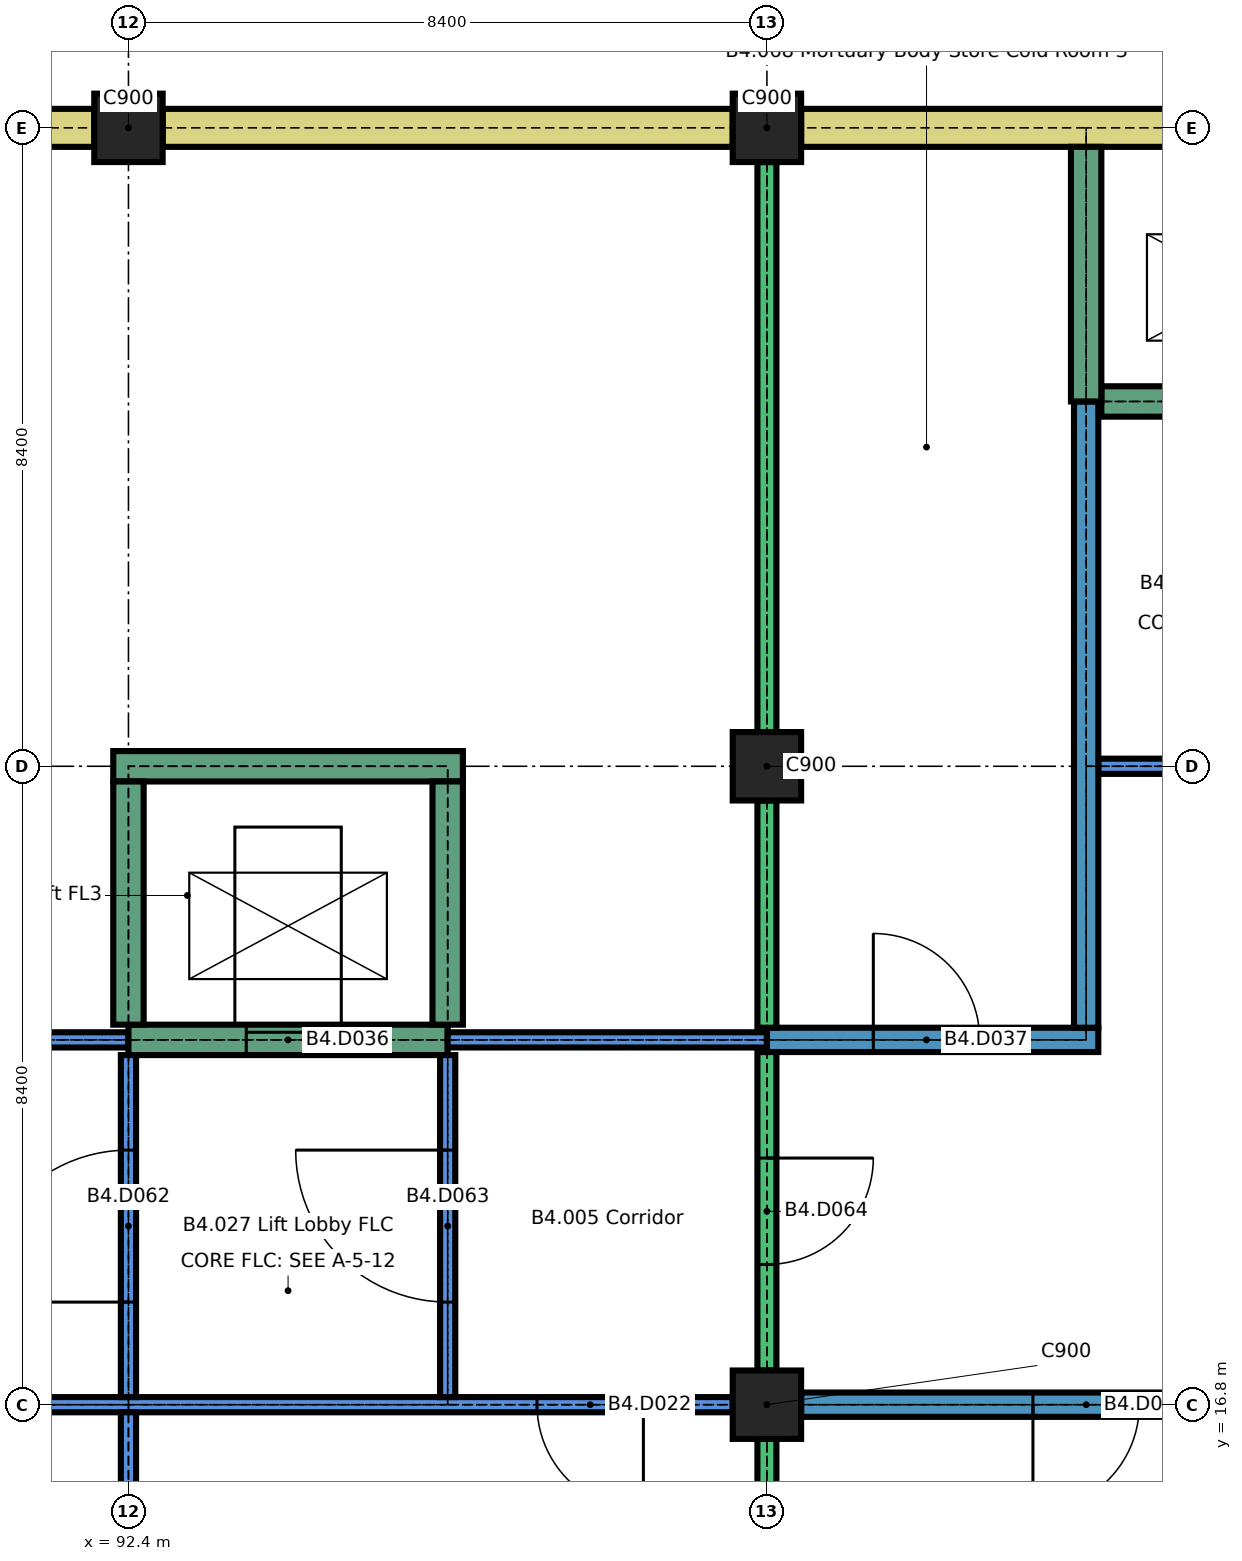
"""IFC4 building model, lengths in metres.
Left out: names, types, materials, properties, quantities, classifications, styles, units other than length and angle.
Written with IfcOpenShell. Run it as: python <this file> out.ifc"""

import sys

from ifc_helpers import new_model, si_unit, direction, frame, frame_2d, origin, origin_2d, place, context, subcontext, project, spatial, rectangle, extrude, element, fill, save


model = new_model("IFC4")
c1 = context("Model", 3, precision=1e-05, world=origin(), true_north=direction((0.0, 1.0)))
c2 = subcontext(c1, "Body", "Model", "MODEL_VIEW")
j1 = project(units=[si_unit("LENGTHUNIT", "METRE"), si_unit("PLANEANGLEUNIT", "RADIAN")], contexts=[c1])
p1 = place(None, origin())
s1 = spatial("IfcSite", under=j1, at=p1, CompositionType="ELEMENT")
p2 = place(p1, origin())
s2 = spatial("IfcBuilding", under=s1, at=p2, CompositionType="ELEMENT")
p3 = place(p2, frame((0.0, 0.0, -15.0)))
s3 = spatial("IfcBuildingStorey", under=s2, at=p3, CompositionType="ELEMENT", Elevation=-15.0)
for number, where, z_axis, x_axis in (
    (1, (100.8, 16.8, 0.0), (0.0, 0.0, 1.0), (1.0, 0.0, 0.0)),
    (2, (100.8, 25.2, 0.0), (0.0, 0.0, 1.0), (1.0, 0.0, 0.0)),
    (3, (92.4, 33.6, 0.0), (0.0, 0.0, 1.0), (1.0, 0.0, 0.0)),
    (4, (100.8, 33.6, 0.0), (0.0, 0.0, 1.0), (1.0, 0.0, 0.0)),
):
    element("IfcColumn", number, at=place(p3, frame(where, z_axis=z_axis, x_axis=x_axis)), inside=s3, PredefinedType="COLUMN", context=c2, shape_type="SweptSolid", body=[
        extrude(rectangle(XDim=0.9, YDim=0.9, at=origin_2d()), origin(), (0.0, 0.0, 1.0), 3.2),
    ])
for number, where, z_axis, x_axis in (
    (5, (84.45, 33.6, 0.0), (0.0, 0.0, 1.0), (1.0, 0.0, 0.0)),
    (6, (92.85, 33.6, 0.0), (0.0, 0.0, 1.0), (1.0, 0.0, 0.0)),
):
    element("IfcWall", number, at=place(p3, frame(where, z_axis=z_axis, x_axis=x_axis)), inside=s3, PredefinedType="SOLIDWALL", context=c2, shape_type="SweptSolid", body=[
        extrude(rectangle(XDim=7.5, YDim=0.5, at=frame_2d((3.75, 0.0))), origin(), (0.0, 0.0, 1.0), 3.2),
    ])
p4 = place(p3, frame((101.25, 33.6, 0.0), z_axis=(0.0, 0.0, 1.0), x_axis=(1.0, 0.0, 0.0)))
e7 = element("IfcWall", 7, at=p4, inside=s3, PredefinedType="SOLIDWALL", context=c2, shape_type="SweptSolid", body=[
    extrude(rectangle(XDim=32.7, YDim=0.5, at=frame_2d((16.35, 0.0))), origin(), (0.0, 0.0, 1.0), 3.2),
])
p5 = place(p3, frame((84.45, 16.8, 0.0), z_axis=(0.0, 0.0, 1.0), x_axis=(1.0, 0.0, 0.0)))
e8 = element("IfcWall", 8, at=p5, inside=s3, PredefinedType="PARTITIONING", context=c2, shape_type="SweptSolid", body=[
    extrude(rectangle(XDim=15.9, YDim=0.2, at=frame_2d((7.95, 0.0))), origin(), (0.0, 0.0, 1.0), 3.2),
])
p6 = place(p5, frame((3.275, 0.0, 0.0)))
e9 = element("IfcOpeningElement", 9, at=p6, cuts=e8, PredefinedType="OPENING", context=c2, shape_type="SweptSolid", body=[
    extrude(rectangle(XDim=1.4, YDim=2.1, at=frame_2d((0.7, 1.05))), frame((0.0, 0.11, 0.0), z_axis=(0.0, -1.0, 0.0), x_axis=(1.0, 0.0, 0.0)), (0.0, 0.0, 1.0), 0.22),
])
p7 = place(p5, frame((13.325, 0.0, 0.0)))
e10 = element("IfcOpeningElement", 10, at=p7, cuts=e8, PredefinedType="OPENING", context=c2, shape_type="SweptSolid", body=[
    extrude(rectangle(XDim=1.4, YDim=2.1, at=frame_2d((0.7, 1.05))), frame((0.0, 0.11, 0.0), z_axis=(0.0, -1.0, 0.0), x_axis=(1.0, 0.0, 0.0)), (0.0, 0.0, 1.0), 0.22),
])
p8 = place(p3, frame((101.25, 16.8, 0.0), z_axis=(0.0, 0.0, 1.0), x_axis=(1.0, 0.0, 0.0)))
e11 = element("IfcWall", 11, at=p8, inside=s3, PredefinedType="SOLIDWALL", context=c2, shape_type="SweptSolid", body=[
    extrude(rectangle(XDim=7.5, YDim=0.32, at=frame_2d((3.75, 0.0))), origin(), (0.0, 0.0, 1.0), 3.2),
])
p9 = place(p8, frame((3.05, 0.0, 0.0)))
e12 = element("IfcOpeningElement", 12, at=p9, cuts=e11, PredefinedType="OPENING", context=c2, shape_type="SweptSolid", body=[
    extrude(rectangle(XDim=1.4, YDim=2.1, at=frame_2d((0.7, 1.05))), frame((0.0, 0.17, 0.0), z_axis=(0.0, -1.0, 0.0), x_axis=(1.0, 0.0, 0.0)), (0.0, 0.0, 1.0), 0.34),
])
p10 = place(p3, frame((75.5, 21.6, 0.0), z_axis=(0.0, 0.0, 1.0), x_axis=(1.0, 0.0, 0.0)))
e13 = element("IfcWall", 13, at=p10, inside=s3, PredefinedType="PARTITIONING", context=c2, shape_type="SweptSolid", body=[
    extrude(rectangle(XDim=16.9, YDim=0.2, at=frame_2d((8.45, 0.0))), origin(), (0.0, 0.0, 1.0), 3.2),
])
p11 = place(p10, frame((7.8, 0.0, 0.0)))
e14 = element("IfcOpeningElement", 14, at=p11, cuts=e13, PredefinedType="OPENING", context=c2, shape_type="SweptSolid", body=[
    extrude(rectangle(XDim=1.4, YDim=2.1, at=frame_2d((0.7, 1.05))), frame((0.0, 0.11, 0.0), z_axis=(0.0, -1.0, 0.0), x_axis=(1.0, 0.0, 0.0)), (0.0, 0.0, 1.0), 0.22),
])
p12 = place(p3, frame((92.4, 21.6, 0.0), z_axis=(0.0, 0.0, 1.0), x_axis=(1.0, 0.0, 0.0)))
e15 = element("IfcWall", 15, at=p12, inside=s3, PredefinedType="SHEAR", context=c2, shape_type="SweptSolid", body=[
    extrude(rectangle(XDim=4.2, YDim=0.4, at=frame_2d((2.1, 0.0))), origin(), (0.0, 0.0, 1.0), 3.2),
])
p13 = place(p12, frame((1.55, 0.0, 0.0)))
e16 = element("IfcOpeningElement", 16, at=p13, cuts=e15, PredefinedType="OPENING", context=c2, shape_type="SweptSolid", body=[
    extrude(rectangle(XDim=1.1, YDim=2.1, at=frame_2d((0.55, 1.05))), frame((0.0, 0.21, 0.0), z_axis=(0.0, -1.0, 0.0), x_axis=(1.0, 0.0, 0.0)), (0.0, 0.0, 1.0), 0.42),
])
p14 = place(p3, frame((96.6, 21.6, 0.0), z_axis=(0.0, 0.0, 1.0), x_axis=(1.0, 0.0, 0.0)))
e17 = element("IfcWall", 17, at=p14, inside=s3, PredefinedType="PARTITIONING", context=c2, shape_type="SweptSolid", body=[
    extrude(rectangle(XDim=4.2, YDim=0.2, at=frame_2d((2.1, 0.0))), origin(), (0.0, 0.0, 1.0), 3.2),
])
p15 = place(p3, frame((100.8, 21.6, 0.0), z_axis=(0.0, 0.0, 1.0), x_axis=(1.0, 0.0, 0.0)))
e18 = element("IfcWall", 18, at=p15, inside=s3, PredefinedType="SOLIDWALL", context=c2, shape_type="SweptSolid", body=[
    extrude(rectangle(XDim=4.36, YDim=0.32, at=frame_2d((2.18, 0.0))), origin(), (0.0, 0.0, 1.0), 3.2),
])
p16 = place(p15, frame((1.4, 0.0, 0.0)))
e19 = element("IfcOpeningElement", 19, at=p16, cuts=e18, PredefinedType="OPENING", context=c2, shape_type="SweptSolid", body=[
    extrude(rectangle(XDim=1.4, YDim=2.1, at=frame_2d((0.7, 1.05))), frame((0.0, 0.17, 0.0), z_axis=(0.0, -1.0, 0.0), x_axis=(1.0, 0.0, 0.0)), (0.0, 0.0, 1.0), 0.34),
])
p17 = place(p3, frame((92.2, 25.2, 0.0), z_axis=(0.0, 0.0, 1.0), x_axis=(1.0, 0.0, 0.0)))
e20 = element("IfcWall", 20, at=p17, inside=s3, PredefinedType="SHEAR", context=c2, shape_type="SweptSolid", body=[
    extrude(rectangle(XDim=4.6, YDim=0.4, at=frame_2d((2.3, 0.0))), origin(), (0.0, 0.0, 1.0), 3.2),
])
p18 = place(p3, frame((105.16, 25.2, 0.0), z_axis=(0.0, 0.0, 1.0), x_axis=(1.0, 0.0, 0.0)))
e21 = element("IfcWall", 21, at=p18, inside=s3, PredefinedType="PARTITIONING", context=c2, shape_type="SweptSolid", body=[
    extrude(rectangle(XDim=3.88, YDim=0.2, at=frame_2d((1.94, 0.0))), origin(), (0.0, 0.0, 1.0), 3.2),
])
p19 = place(p18, frame((0.94, 0.0, 0.0)))
e22 = element("IfcOpeningElement", 22, at=p19, cuts=e21, PredefinedType="OPENING", context=c2, shape_type="SweptSolid", body=[
    extrude(rectangle(XDim=2.0, YDim=2.4, at=frame_2d((1.0, 1.2))), frame((0.0, 0.11, 0.0), z_axis=(0.0, -1.0, 0.0), x_axis=(1.0, 0.0, 0.0)), (0.0, 0.0, 1.0), 0.22),
])
p20 = place(p3, frame((105.2, 30.0, 0.0), z_axis=(0.0, 0.0, 1.0), x_axis=(1.0, 0.0, 0.0)))
e23 = element("IfcWall", 23, at=p20, inside=s3, PredefinedType="SHEAR", context=c2, shape_type="SweptSolid", body=[
    extrude(rectangle(XDim=3.8, YDim=0.4, at=frame_2d((1.9, 0.0))), origin(), (0.0, 0.0, 1.0), 3.2),
])
p21 = place(p20, frame((1.35, 0.0, 0.0)))
e24 = element("IfcOpeningElement", 24, at=p21, cuts=e23, PredefinedType="OPENING", context=c2, shape_type="SweptSolid", body=[
    extrude(rectangle(XDim=1.1, YDim=2.1, at=frame_2d((0.55, 1.05))), frame((0.0, 0.21, 0.0), z_axis=(0.0, -1.0, 0.0), x_axis=(1.0, 0.0, 0.0)), (0.0, 0.0, 1.0), 0.42),
])
p22 = place(p3, frame((92.4, 8.85, 0.0), z_axis=(0.0, 0.0, 1.0), x_axis=(0.0, 1.0, 0.0)))
e25 = element("IfcWall", 25, at=p22, inside=s3, PredefinedType="PARTITIONING", context=c2, shape_type="SweptSolid", body=[
    extrude(rectangle(XDim=7.85, YDim=0.2, at=frame_2d((3.925, 0.0))), origin(), (0.0, 0.0, 1.0), 3.2),
])
p23 = place(p3, frame((92.4, 16.9, 0.0), z_axis=(0.0, 0.0, 1.0), x_axis=(0.0, 1.0, 0.0)))
e26 = element("IfcWall", 26, at=p23, inside=s3, PredefinedType="PARTITIONING", context=c2, shape_type="SweptSolid", body=[
    extrude(rectangle(XDim=4.5, YDim=0.2, at=frame_2d((2.25, 0.0))), origin(), (0.0, 0.0, 1.0), 3.2),
])
p24 = place(p23, frame((1.25, 0.0, 0.0)))
e27 = element("IfcOpeningElement", 27, at=p24, cuts=e26, PredefinedType="OPENING", context=c2, shape_type="SweptSolid", body=[
    extrude(rectangle(XDim=2.0, YDim=2.4, at=frame_2d((1.0, 1.2))), frame((0.0, 0.11, 0.0), z_axis=(0.0, -1.0, 0.0), x_axis=(1.0, 0.0, 0.0)), (0.0, 0.0, 1.0), 0.22),
])
p25 = place(p3, frame((92.4, 21.8, 0.0), z_axis=(0.0, 0.0, 1.0), x_axis=(0.0, 1.0, 0.0)))
e28 = element("IfcWall", 28, at=p25, inside=s3, PredefinedType="SHEAR", context=c2, shape_type="SweptSolid", body=[
    extrude(rectangle(XDim=3.2, YDim=0.4, at=frame_2d((1.6, 0.0))), origin(), (0.0, 0.0, 1.0), 3.2),
])
p26 = place(p3, frame((96.6, 16.9, 0.0), z_axis=(0.0, 0.0, 1.0), x_axis=(0.0, 1.0, 0.0)))
e29 = element("IfcWall", 29, at=p26, inside=s3, PredefinedType="PARTITIONING", context=c2, shape_type="SweptSolid", body=[
    extrude(rectangle(XDim=4.5, YDim=0.2, at=frame_2d((2.25, 0.0))), origin(), (0.0, 0.0, 1.0), 3.2),
])
p27 = place(p26, frame((1.25, 0.0, 0.0)))
e30 = element("IfcOpeningElement", 30, at=p27, cuts=e29, PredefinedType="OPENING", context=c2, shape_type="SweptSolid", body=[
    extrude(rectangle(XDim=2.0, YDim=2.4, at=frame_2d((1.0, 1.2))), frame((0.0, 0.11, 0.0), z_axis=(0.0, -1.0, 0.0), x_axis=(1.0, 0.0, 0.0)), (0.0, 0.0, 1.0), 0.22),
])
p28 = place(p3, frame((96.6, 21.8, 0.0), z_axis=(0.0, 0.0, 1.0), x_axis=(0.0, 1.0, 0.0)))
e31 = element("IfcWall", 31, at=p28, inside=s3, PredefinedType="SHEAR", context=c2, shape_type="SweptSolid", body=[
    extrude(rectangle(XDim=3.2, YDim=0.4, at=frame_2d((1.6, 0.0))), origin(), (0.0, 0.0, 1.0), 3.2),
])
p29 = place(p3, frame((100.8, 8.85, 0.0), z_axis=(0.0, 0.0, 1.0), x_axis=(0.0, 1.0, 0.0)))
e32 = element("IfcWall", 32, at=p29, inside=s3, PredefinedType="SOLIDWALL", context=c2, shape_type="SweptSolid", body=[
    extrude(rectangle(XDim=7.5, YDim=0.25, at=frame_2d((3.75, 0.0))), origin(), (0.0, 0.0, 1.0), 3.2),
])
p30 = place(p3, frame((100.8, 17.25, 0.0), z_axis=(0.0, 0.0, 1.0), x_axis=(0.0, 1.0, 0.0)))
e33 = element("IfcWall", 33, at=p30, inside=s3, PredefinedType="SOLIDWALL", context=c2, shape_type="SweptSolid", body=[
    extrude(rectangle(XDim=4.19, YDim=0.25, at=frame_2d((2.095, 0.0))), origin(), (0.0, 0.0, 1.0), 3.2),
])
p31 = place(p30, frame((1.395, 0.0, 0.0)))
e34 = element("IfcOpeningElement", 34, at=p31, cuts=e33, PredefinedType="OPENING", context=c2, shape_type="SweptSolid", body=[
    extrude(rectangle(XDim=1.4, YDim=2.1, at=frame_2d((0.7, 1.05))), frame((0.0, 0.135, 0.0), z_axis=(0.0, -1.0, 0.0), x_axis=(1.0, 0.0, 0.0)), (0.0, 0.0, 1.0), 0.27),
])
p32 = place(p3, frame((100.8, 21.76, 0.0), z_axis=(0.0, 0.0, 1.0), x_axis=(0.0, 1.0, 0.0)))
e35 = element("IfcWall", 35, at=p32, inside=s3, PredefinedType="SOLIDWALL", context=c2, shape_type="SweptSolid", body=[
    extrude(rectangle(XDim=2.99, YDim=0.25, at=frame_2d((1.495, 0.0))), origin(), (0.0, 0.0, 1.0), 3.2),
])
p33 = place(p3, frame((100.8, 25.65, 0.0), z_axis=(0.0, 0.0, 1.0), x_axis=(0.0, 1.0, 0.0)))
e36 = element("IfcWall", 36, at=p33, inside=s3, PredefinedType="SOLIDWALL", context=c2, shape_type="SweptSolid", body=[
    extrude(rectangle(XDim=7.5, YDim=0.25, at=frame_2d((3.75, 0.0))), origin(), (0.0, 0.0, 1.0), 3.2),
])
p34 = place(p3, frame((105.0, 21.76, 0.0), z_axis=(0.0, 0.0, 1.0), x_axis=(0.0, 1.0, 0.0)))
e37 = element("IfcWall", 37, at=p34, inside=s3, PredefinedType="SOLIDWALL", context=c2, shape_type="SweptSolid", body=[
    extrude(rectangle(XDim=8.24, YDim=0.32, at=frame_2d((4.12, 0.0))), origin(), (0.0, 0.0, 1.0), 3.2),
])
p35 = place(p3, frame((105.0, 30.0, 0.0), z_axis=(0.0, 0.0, 1.0), x_axis=(0.0, 1.0, 0.0)))
e38 = element("IfcWall", 38, at=p35, inside=s3, PredefinedType="SHEAR", context=c2, shape_type="SweptSolid", body=[
    extrude(rectangle(XDim=3.35, YDim=0.4, at=frame_2d((1.675, 0.0))), origin(), (0.0, 0.0, 1.0), 3.2),
])
p36 = place(p7, origin())
e39 = element("IfcDoor", 39, at=p36, inside=s3, OperationType="SINGLE_SWING_RIGHT", PredefinedType="DOOR", context=c2, shape_type="SweptSolid", body=[
    extrude(rectangle(XDim=1.4, YDim=2.1, at=frame_2d((0.7, 1.05))), frame((0.0, 0.025, 0.0), z_axis=(0.0, -1.0, 0.0), x_axis=(1.0, 0.0, 0.0)), (0.0, 0.0, 1.0), 0.05),
])
fill(e10, e39)
p37 = place(p9, origin())
e40 = element("IfcDoor", 40, at=p37, inside=s3, OperationType="SINGLE_SWING_LEFT", PredefinedType="DOOR", context=c2, shape_type="SweptSolid", body=[
    extrude(rectangle(XDim=1.4, YDim=2.1, at=frame_2d((0.7, 1.05))), frame((0.0, 0.05, 0.0), z_axis=(0.0, -1.0, 0.0), x_axis=(1.0, 0.0, 0.0)), (0.0, 0.0, 1.0), 0.1),
])
fill(e12, e40)
p38 = place(p13, origin())
e41 = element("IfcDoor", 41, at=p38, inside=s3, OperationType="SLIDING_TO_LEFT", PredefinedType="DOOR", context=c2, shape_type="SweptSolid", body=[
    extrude(rectangle(XDim=1.1, YDim=2.1, at=frame_2d((0.55, 1.05))), frame((0.0, 0.025, 0.0), z_axis=(0.0, -1.0, 0.0), x_axis=(1.0, 0.0, 0.0)), (0.0, 0.0, 1.0), 0.05),
])
fill(e16, e41)
p39 = place(p16, origin())
e42 = element("IfcDoor", 42, at=p39, inside=s3, OperationType="SINGLE_SWING_RIGHT", PredefinedType="DOOR", context=c2, shape_type="SweptSolid", body=[
    extrude(rectangle(XDim=1.4, YDim=2.1, at=frame_2d((0.7, 1.05))), frame((0.0, 0.05, 0.0), z_axis=(0.0, -1.0, 0.0), x_axis=(1.0, 0.0, 0.0)), (0.0, 0.0, 1.0), 0.1),
])
fill(e19, e42)
p40 = place(p24, origin())
e43 = element("IfcDoor", 43, at=p40, inside=s3, OperationType="SINGLE_SWING_RIGHT", PredefinedType="DOOR", context=c2, shape_type="SweptSolid", body=[
    extrude(rectangle(XDim=2.0, YDim=2.4, at=frame_2d((1.0, 1.2))), frame((0.0, 0.03, 0.0), z_axis=(0.0, -1.0, 0.0), x_axis=(1.0, 0.0, 0.0)), (0.0, 0.0, 1.0), 0.06),
])
fill(e27, e43)
p41 = place(p27, origin())
e44 = element("IfcDoor", 44, at=p41, inside=s3, OperationType="SINGLE_SWING_LEFT", PredefinedType="DOOR", context=c2, shape_type="SweptSolid", body=[
    extrude(rectangle(XDim=2.0, YDim=2.4, at=frame_2d((1.0, 1.2))), frame((0.0, 0.03, 0.0), z_axis=(0.0, -1.0, 0.0), x_axis=(1.0, 0.0, 0.0)), (0.0, 0.0, 1.0), 0.06),
])
fill(e30, e44)
p42 = place(p31, origin())
e45 = element("IfcDoor", 45, at=p42, inside=s3, OperationType="SINGLE_SWING_RIGHT", PredefinedType="DOOR", context=c2, shape_type="SweptSolid", body=[
    extrude(rectangle(XDim=1.4, YDim=2.1, at=frame_2d((0.7, 1.05))), frame((0.0, 0.03, 0.0), z_axis=(0.0, -1.0, 0.0), x_axis=(1.0, 0.0, 0.0)), (0.0, 0.0, 1.0), 0.06),
])
fill(e34, e45)
save(model, sys.argv[1])
